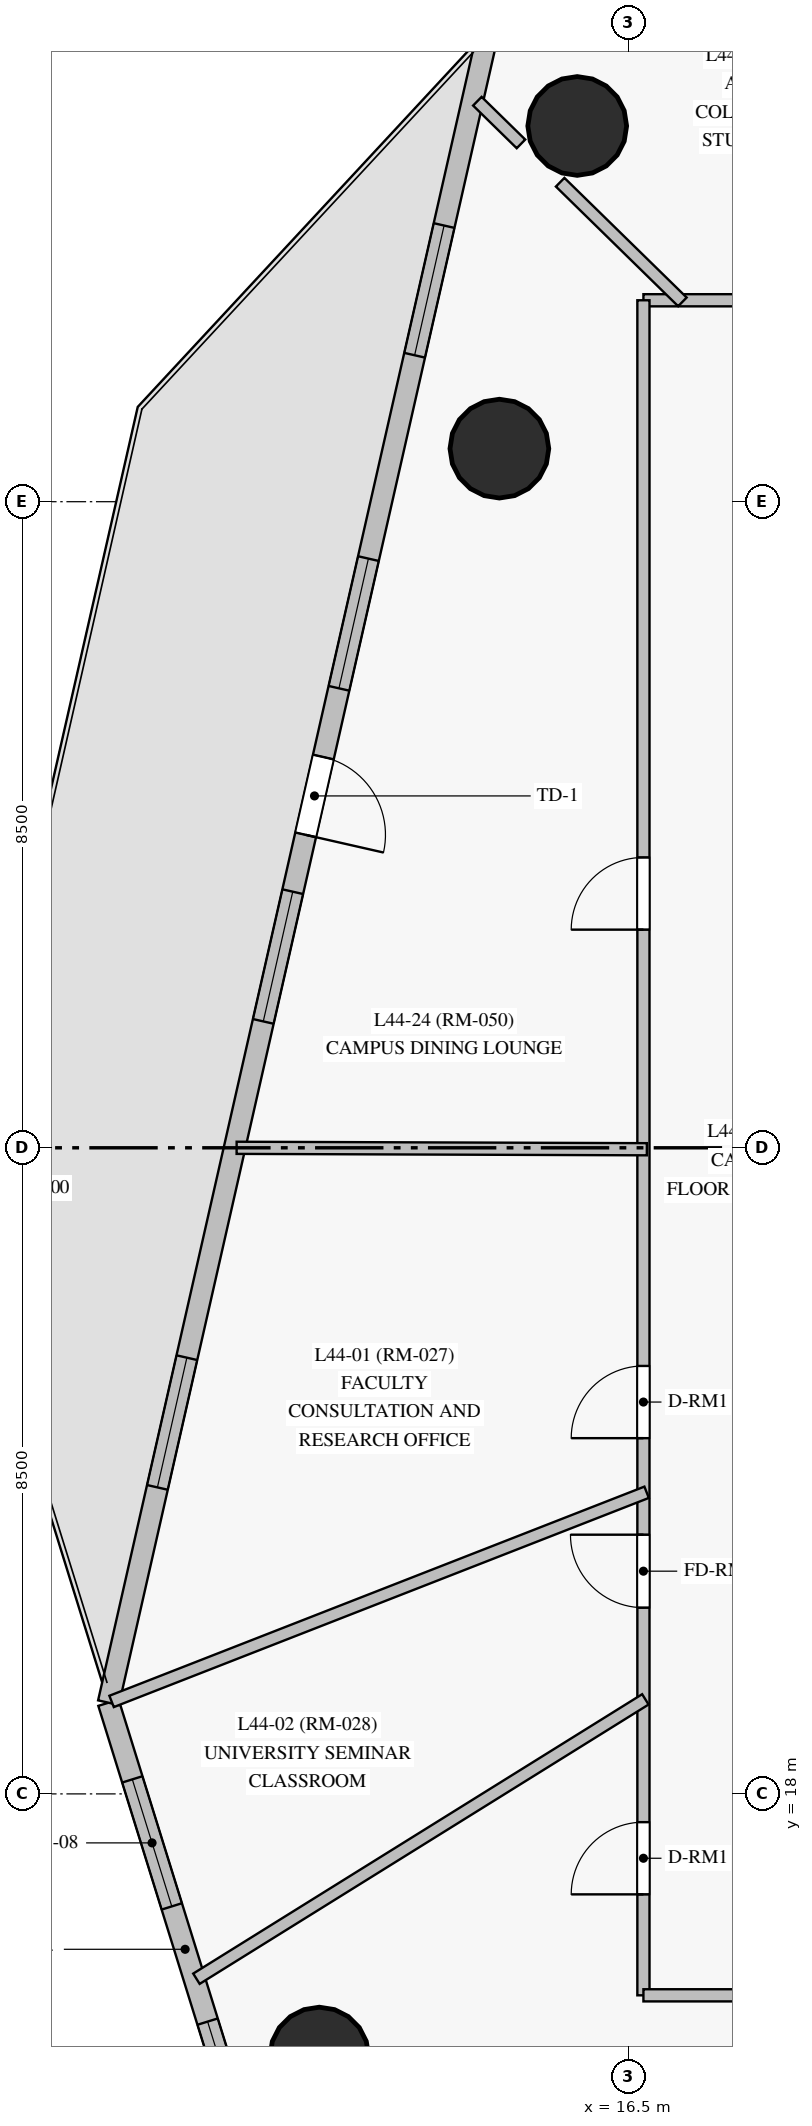
"""IFC4 building model, lengths in metres.
Left out: names, types, materials, properties, quantities, classifications, styles, units other than length and angle.
Written with IfcOpenShell. Run it as: python <this file> out.ifc"""

import sys

from ifc_helpers import new_model, si_unit, direction, frame, frame_2d, origin, origin_with_axes, origin_2d, place, context, subcontext, project, spatial, rectangle, circle, extrude, source, transform, mapped, element, fill, save


model = new_model("IFC4")
c1 = context("Model", 3, precision=1e-05, world=origin(), true_north=direction((0.0, 1.0)))
c2 = subcontext(c1, "Body", "Model", "MODEL_VIEW")
j1 = project(units=[si_unit("LENGTHUNIT", "METRE"), si_unit("PLANEANGLEUNIT", "RADIAN")], contexts=[c1])
p1 = place(None, origin())
s1 = spatial("IfcSite", under=j1, at=p1, CompositionType="ELEMENT")
p2 = place(p1, origin())
s2 = spatial("IfcBuilding", under=s1, at=p2, CompositionType="ELEMENT")
p3 = place(p2, frame((0.0, 0.0, 156.55)))
s3 = spatial("IfcBuildingStorey", under=s2, at=p3, CompositionType="ELEMENT", Elevation=156.55)
m1 = source(origin_with_axes(), c2, "Body", "SweptSolid", [
    extrude(circle(Radius=0.65, at=origin_2d()), origin(), (0.0, 0.0, 1.0), 3.05),
])
for number, where, z_axis, x_axis in (
    (1, (15.829, 39.943, 0.0), (0.0, 0.0, 1.0), (1.0, 0.0, 0.0)),
    (2, (14.805, 35.698, 0.0), (0.0, 0.0, 1.0), (1.0, 0.0, 0.0)),
    (3, (12.436, 14.544, 0.0), (0.0, 0.0, 1.0), (1.0, 0.0, 0.0)),
):
    element("IfcColumn", number, at=place(p3, frame(where, z_axis=z_axis, x_axis=x_axis)), inside=s3, PredefinedType="COLUMN", context=c2, shape_type="MappedRepresentation", body=[
        mapped(m1, transform((0.0, 0.0, 0.0), scale=1.0)),
    ])
p4 = place(p3, frame((9.662, 19.2, 0.0), z_axis=(0.0, 0.0, 1.0), x_axis=(0.2968015378, -0.954939185058, 0.0)))
e4 = element("IfcWall", 4, at=p4, inside=s3, PredefinedType="SOLIDWALL", context=c2, shape_type="SweptSolid", body=[
    extrude(rectangle(XDim=6.794, YDim=0.28, at=frame_2d((3.397, 0.0))), origin(), (0.0, 0.0, 1.0), 2.825),
])
p5 = place(p4, frame((1.056, 0.0, 0.85)))
e5 = element("IfcOpeningElement", 5, at=p5, cuts=e4, PredefinedType="OPENING", context=c2, shape_type="SweptSolid", body=[
    extrude(rectangle(XDim=1.75, YDim=1.65, at=frame_2d((0.875, 0.825))), frame((0.0, 0.15, 0.0), z_axis=(0.0, -1.0, 0.0), x_axis=(1.0, 0.0, 0.0)), (0.0, 0.0, 1.0), 0.3),
])
p6 = place(p4, frame((4.393, 0.0, 0.85)))
e6 = element("IfcOpeningElement", 6, at=p6, cuts=e4, PredefinedType="OPENING", context=c2, shape_type="SweptSolid", body=[
    extrude(rectangle(XDim=1.75, YDim=1.65, at=frame_2d((0.875, 0.825))), frame((0.0, 0.15, 0.0), z_axis=(0.0, -1.0, 0.0), x_axis=(1.0, 0.0, 0.0)), (0.0, 0.0, 1.0), 0.3),
])
p7 = place(p3, frame((14.666, 41.223, 0.0), z_axis=(0.0, 0.0, 1.0), x_axis=(-0.221558962352, -0.975146976718, 0.0)))
e7 = element("IfcWall", 7, at=p7, inside=s3, PredefinedType="SOLIDWALL", context=c2, shape_type="SweptSolid", body=[
    extrude(rectangle(XDim=22.585, YDim=0.28, at=frame_2d((11.292, 0.0))), origin(), (0.0, 0.0, 1.0), 2.825),
])
p8 = place(p7, frame((2.656, 0.0, 0.85)))
e8 = element("IfcOpeningElement", 8, at=p8, cuts=e7, PredefinedType="OPENING", context=c2, shape_type="SweptSolid", body=[
    extrude(rectangle(XDim=1.75, YDim=1.65, at=frame_2d((0.875, 0.825))), frame((0.0, 0.15, 0.0), z_axis=(0.0, -1.0, 0.0), x_axis=(1.0, 0.0, 0.0)), (0.0, 0.0, 1.0), 0.3),
])
p9 = place(p7, frame((7.15, 0.0, 0.85)))
e9 = element("IfcOpeningElement", 9, at=p9, cuts=e7, PredefinedType="OPENING", context=c2, shape_type="SweptSolid", body=[
    extrude(rectangle(XDim=1.75, YDim=1.65, at=frame_2d((0.875, 0.825))), frame((0.0, 0.15, 0.0), z_axis=(0.0, -1.0, 0.0), x_axis=(1.0, 0.0, 0.0)), (0.0, 0.0, 1.0), 0.3),
])
p10 = place(p7, frame((11.643, 0.0, 0.85)))
e10 = element("IfcOpeningElement", 10, at=p10, cuts=e7, PredefinedType="OPENING", context=c2, shape_type="SweptSolid", body=[
    extrude(rectangle(XDim=1.75, YDim=1.65, at=frame_2d((0.875, 0.825))), frame((0.0, 0.15, 0.0), z_axis=(0.0, -1.0, 0.0), x_axis=(1.0, 0.0, 0.0)), (0.0, 0.0, 1.0), 0.3),
])
p11 = place(p7, frame((17.93, 0.0, 0.85)))
e11 = element("IfcOpeningElement", 11, at=p11, cuts=e7, PredefinedType="OPENING", context=c2, shape_type="SweptSolid", body=[
    extrude(rectangle(XDim=1.75, YDim=1.65, at=frame_2d((0.875, 0.825))), frame((0.0, 0.15, 0.0), z_axis=(0.0, -1.0, 0.0), x_axis=(1.0, 0.0, 0.0)), (0.0, 0.0, 1.0), 0.3),
])
p12 = place(p7, frame((9.826, 0.0, 0.0)))
e12 = element("IfcOpeningElement", 12, at=p12, cuts=e7, PredefinedType="OPENING", context=c2, shape_type="SweptSolid", body=[
    extrude(rectangle(XDim=1.05, YDim=2.12, at=frame_2d((0.525, 1.06))), frame((0.0, 0.15, 0.0), z_axis=(0.0, -1.0, 0.0), x_axis=(1.0, 0.0, 0.0)), (0.0, 0.0, 1.0), 0.3),
])
p13 = place(p3, frame((16.7, 37.65, 0.0), z_axis=(0.0, 0.0, 1.0), x_axis=(1.0, 0.0, 0.0)))
e13 = element("IfcWall", 13, at=p13, inside=s3, PredefinedType="PARTITIONING", context=c2, shape_type="SweptSolid", body=[
    extrude(rectangle(XDim=23.5, YDim=0.16, at=frame_2d((11.75, 0.0))), origin(), (0.0, 0.0, 1.0), 2.375),
])
p14 = place(p13, frame((21.26, 0.0, 0.0)))
e14 = element("IfcOpeningElement", 14, at=p14, cuts=e13, PredefinedType="OPENING", context=c2, shape_type="SweptSolid", body=[
    extrude(rectangle(XDim=0.95, YDim=2.15, at=frame_2d((0.475, 1.075))), frame((0.0, 0.09, 0.0), z_axis=(0.0, -1.0, 0.0), x_axis=(1.0, 0.0, 0.0)), (0.0, 0.0, 1.0), 0.18),
])
p15 = place(p13, frame((17.365, 0.0, 0.0)))
e15 = element("IfcOpeningElement", 15, at=p15, cuts=e13, PredefinedType="OPENING", context=c2, shape_type="SweptSolid", body=[
    extrude(rectangle(XDim=0.86, YDim=2.1, at=frame_2d((0.43, 1.05))), frame((0.0, 0.09, 0.0), z_axis=(0.0, -1.0, 0.0), x_axis=(1.0, 0.0, 0.0)), (0.0, 0.0, 1.0), 0.18),
])
p16 = place(p13, frame((15.16, 0.0, 0.0)))
e16 = element("IfcOpeningElement", 16, at=p16, cuts=e13, PredefinedType="OPENING", context=c2, shape_type="SweptSolid", body=[
    extrude(rectangle(XDim=0.95, YDim=2.15, at=frame_2d((0.475, 1.075))), frame((0.0, 0.09, 0.0), z_axis=(0.0, -1.0, 0.0), x_axis=(1.0, 0.0, 0.0)), (0.0, 0.0, 1.0), 0.18),
])
p17 = place(p13, frame((13.06, 0.0, 0.0)))
e17 = element("IfcOpeningElement", 17, at=p17, cuts=e13, PredefinedType="OPENING", context=c2, shape_type="SweptSolid", body=[
    extrude(rectangle(XDim=0.95, YDim=2.15, at=frame_2d((0.475, 1.075))), frame((0.0, 0.09, 0.0), z_axis=(0.0, -1.0, 0.0), x_axis=(1.0, 0.0, 0.0)), (0.0, 0.0, 1.0), 0.18),
])
p18 = place(p13, frame((10.973, 0.0, 0.0)))
e18 = element("IfcOpeningElement", 18, at=p18, cuts=e13, PredefinedType="OPENING", context=c2, shape_type="SweptSolid", body=[
    extrude(rectangle(XDim=0.95, YDim=2.15, at=frame_2d((0.475, 1.075))), frame((0.0, 0.09, 0.0), z_axis=(0.0, -1.0, 0.0), x_axis=(1.0, 0.0, 0.0)), (0.0, 0.0, 1.0), 0.18),
])
p19 = place(p13, frame((8.885, 0.0, 0.0)))
e19 = element("IfcOpeningElement", 19, at=p19, cuts=e13, PredefinedType="OPENING", context=c2, shape_type="SweptSolid", body=[
    extrude(rectangle(XDim=0.95, YDim=2.15, at=frame_2d((0.475, 1.075))), frame((0.0, 0.09, 0.0), z_axis=(0.0, -1.0, 0.0), x_axis=(1.0, 0.0, 0.0)), (0.0, 0.0, 1.0), 0.18),
])
p20 = place(p13, frame((6.51, 0.0, 0.0)))
e20 = element("IfcOpeningElement", 20, at=p20, cuts=e13, PredefinedType="OPENING", context=c2, shape_type="SweptSolid", body=[
    extrude(rectangle(XDim=0.95, YDim=2.15, at=frame_2d((0.475, 1.075))), frame((0.0, 0.09, 0.0), z_axis=(0.0, -1.0, 0.0), x_axis=(1.0, 0.0, 0.0)), (0.0, 0.0, 1.0), 0.18),
])
p21 = place(p13, frame((3.96, 0.0, 0.0)))
e21 = element("IfcOpeningElement", 21, at=p21, cuts=e13, PredefinedType="OPENING", context=c2, shape_type="SweptSolid", body=[
    extrude(rectangle(XDim=0.95, YDim=2.15, at=frame_2d((0.475, 1.075))), frame((0.0, 0.09, 0.0), z_axis=(0.0, -1.0, 0.0), x_axis=(1.0, 0.0, 0.0)), (0.0, 0.0, 1.0), 0.18),
])
p22 = place(p13, frame((2.364, 0.0, 0.0)))
e22 = element("IfcOpeningElement", 22, at=p22, cuts=e13, PredefinedType="OPENING", context=c2, shape_type="SweptSolid", body=[
    extrude(rectangle(XDim=0.95, YDim=2.15, at=frame_2d((0.475, 1.075))), frame((0.0, 0.09, 0.0), z_axis=(0.0, -1.0, 0.0), x_axis=(1.0, 0.0, 0.0)), (0.0, 0.0, 1.0), 0.18),
])
p23 = place(p3, frame((16.7, 15.35, 0.0), z_axis=(0.0, 0.0, 1.0), x_axis=(0.0, 1.0, 0.0)))
e23 = element("IfcWall", 23, at=p23, inside=s3, PredefinedType="PARTITIONING", context=c2, shape_type="SweptSolid", body=[
    extrude(rectangle(XDim=22.3, YDim=0.16, at=frame_2d((11.15, 0.0))), origin(), (0.0, 0.0, 1.0), 2.275),
])
p24 = place(p23, frame((7.33, 0.0, 0.0)))
e24 = element("IfcOpeningElement", 24, at=p24, cuts=e23, PredefinedType="OPENING", context=c2, shape_type="SweptSolid", body=[
    extrude(rectangle(XDim=0.95, YDim=2.15, at=frame_2d((0.475, 1.075))), frame((0.0, 0.09, 0.0), z_axis=(0.0, -1.0, 0.0), x_axis=(1.0, 0.0, 0.0)), (0.0, 0.0, 1.0), 0.18),
])
p25 = place(p23, frame((5.1, 0.0, 0.0)))
e25 = element("IfcOpeningElement", 25, at=p25, cuts=e23, PredefinedType="OPENING", context=c2, shape_type="SweptSolid", body=[
    extrude(rectangle(XDim=0.96, YDim=2.15, at=frame_2d((0.48, 1.075))), frame((0.0, 0.09, 0.0), z_axis=(0.0, -1.0, 0.0), x_axis=(1.0, 0.0, 0.0)), (0.0, 0.0, 1.0), 0.18),
])
p26 = place(p23, frame((1.328, 0.0, 0.0)))
e26 = element("IfcOpeningElement", 26, at=p26, cuts=e23, PredefinedType="OPENING", context=c2, shape_type="SweptSolid", body=[
    extrude(rectangle(XDim=0.95, YDim=2.15, at=frame_2d((0.475, 1.075))), frame((0.0, 0.09, 0.0), z_axis=(0.0, -1.0, 0.0), x_axis=(1.0, 0.0, 0.0)), (0.0, 0.0, 1.0), 0.18),
])
p27 = place(p23, frame((14.02, 0.0, 0.0)))
e27 = element("IfcOpeningElement", 27, at=p27, cuts=e23, PredefinedType="OPENING", context=c2, shape_type="SweptSolid", body=[
    extrude(rectangle(XDim=0.95, YDim=2.15, at=frame_2d((0.475, 1.075))), frame((0.0, 0.09, 0.0), z_axis=(0.0, -1.0, 0.0), x_axis=(1.0, 0.0, 0.0)), (0.0, 0.0, 1.0), 0.18),
])
p28 = place(p3, frame((27.55, 15.35, 0.0), z_axis=(0.0, 0.0, 1.0), x_axis=(-1.0, 0.0, 0.0)))
e28 = element("IfcWall", 28, at=p28, inside=s3, PredefinedType="PARTITIONING", context=c2, shape_type="SweptSolid", body=[
    extrude(rectangle(XDim=10.85, YDim=0.16, at=frame_2d((5.425, 0.0))), origin(), (0.0, 0.0, 1.0), 2.375),
])
p29 = place(p28, frame((5.24, 0.0, 0.0)))
e29 = element("IfcOpeningElement", 29, at=p29, cuts=e28, PredefinedType="OPENING", context=c2, shape_type="SweptSolid", body=[
    extrude(rectangle(XDim=0.95, YDim=2.15, at=frame_2d((0.475, 1.075))), frame((0.0, 0.09, 0.0), z_axis=(0.0, -1.0, 0.0), x_axis=(1.0, 0.0, 0.0)), (0.0, 0.0, 1.0), 0.18),
])
p30 = place(p28, frame((3.323, 0.0, 0.0)))
e30 = element("IfcOpeningElement", 30, at=p30, cuts=e28, PredefinedType="OPENING", context=c2, shape_type="SweptSolid", body=[
    extrude(rectangle(XDim=0.95, YDim=2.15, at=frame_2d((0.475, 1.075))), frame((0.0, 0.09, 0.0), z_axis=(0.0, -1.0, 0.0), x_axis=(1.0, 0.0, 0.0)), (0.0, 0.0, 1.0), 0.18),
])
p31 = place(p3, frame((22.782, 15.39, 0.0), z_axis=(0.0, 0.0, 1.0), x_axis=(-0.453312470981, -0.891351672267, 0.0)))
e31 = element("IfcWall", 31, at=p31, inside=s3, PredefinedType="PARTITIONING", context=c2, shape_type="SweptSolid", body=[
    extrude(rectangle(XDim=10.694, YDim=0.16, at=frame_2d((5.347, 0.0))), origin(), (0.0, 0.0, 1.0), 2.825),
])
p32 = place(p3, frame((16.742, 21.968, 0.0), z_axis=(0.0, 0.0, 1.0), x_axis=(-0.931359979556, -0.364099695799, 0.0)))
e32 = element("IfcWall", 32, at=p32, inside=s3, PredefinedType="PARTITIONING", context=c2, shape_type="SweptSolid", body=[
    extrude(rectangle(XDim=7.558, YDim=0.16, at=frame_2d((3.779, 0.0))), origin(), (0.0, 0.0, 1.0), 2.825),
])
p33 = place(p3, frame((19.094, 15.385, 0.0), z_axis=(0.0, 0.0, 1.0), x_axis=(-0.642788201526, -0.766043946506, 0.0)))
e33 = element("IfcWall", 33, at=p33, inside=s3, PredefinedType="PARTITIONING", context=c2, shape_type="SweptSolid", body=[
    extrude(rectangle(XDim=7.331, YDim=0.16, at=frame_2d((3.666, 0.0))), origin(), (0.0, 0.0, 1.0), 2.275),
])
p34 = place(p3, frame((16.726, 19.243, 0.0), z_axis=(0.0, 0.0, 1.0), x_axis=(-0.849037712217, -0.528332247012, 0.0)))
e34 = element("IfcWall", 34, at=p34, inside=s3, PredefinedType="PARTITIONING", context=c2, shape_type="SweptSolid", body=[
    extrude(rectangle(XDim=6.956, YDim=0.16, at=frame_2d((3.478, 0.0))), origin(), (0.0, 0.0, 1.0), 2.825),
])
p35 = place(p3, frame((11.348, 26.5, 0.0), z_axis=(0.0, 0.0, 1.0), x_axis=(0.999993933654, -0.003483196096, 0.0)))
e35 = element("IfcWall", 35, at=p35, inside=s3, PredefinedType="PARTITIONING", context=c2, shape_type="SweptSolid", body=[
    extrude(rectangle(XDim=5.397, YDim=0.16, at=frame_2d((2.698, 0.0))), origin(), (0.0, 0.0, 1.0), 2.825),
])
p36 = place(p3, frame((17.213, 37.629, 0.0), z_axis=(0.0, 0.0, 1.0), x_axis=(-0.71471376476, 0.699417067609, 0.0)))
e36 = element("IfcWall", 36, at=p36, inside=s3, PredefinedType="PARTITIONING", context=c2, shape_type="SweptSolid", body=[
    extrude(rectangle(XDim=2.25, YDim=0.16, at=frame_2d((1.125, 0.0))), origin(), (0.0, 0.0, 1.0), 2.275),
])
p37 = place(p3, frame((15.089, 39.707, 0.0), z_axis=(0.0, 0.0, 1.0), x_axis=(-0.714817505013, 0.699311042761, 0.0)))
e37 = element("IfcWall", 37, at=p37, inside=s3, PredefinedType="PARTITIONING", context=c2, shape_type="SweptSolid", body=[
    extrude(rectangle(XDim=0.803, YDim=0.16, at=frame_2d((0.401, 0.0))), origin(), (0.0, 0.0, 1.0), 2.825),
])
m2 = source(origin_with_axes(), c2, "Body", "SweptSolid", [
    extrude(rectangle(XDim=1.75, YDim=1.65, at=frame_2d((0.875, 0.825))), frame((0.0, 0.03, 0.0), z_axis=(0.0, -1.0, 0.0), x_axis=(1.0, 0.0, 0.0)), (0.0, 0.0, 1.0), 0.06),
])
p38 = place(p5, origin())
e38 = element("IfcWindow", 38, at=p38, inside=s3, PartitioningType="SINGLE_PANEL", PredefinedType="WINDOW", context=c2, shape_type="MappedRepresentation", body=[
    mapped(m2, transform((0.0, 0.0, 0.0), scale=1.0)),
])
fill(e5, e38)
p39 = place(p6, origin())
e39 = element("IfcWindow", 39, at=p39, inside=s3, PartitioningType="SINGLE_PANEL", PredefinedType="WINDOW", context=c2, shape_type="MappedRepresentation", body=[
    mapped(m2, transform((0.0, 0.0, 0.0), scale=1.0)),
])
fill(e6, e39)
p40 = place(p8, origin())
e40 = element("IfcWindow", 40, at=p40, inside=s3, PartitioningType="SINGLE_PANEL", PredefinedType="WINDOW", context=c2, shape_type="MappedRepresentation", body=[
    mapped(m2, transform((0.0, 0.0, 0.0), scale=1.0)),
])
fill(e8, e40)
p41 = place(p9, origin())
e41 = element("IfcWindow", 41, at=p41, inside=s3, PartitioningType="SINGLE_PANEL", PredefinedType="WINDOW", context=c2, shape_type="MappedRepresentation", body=[
    mapped(m2, transform((0.0, 0.0, 0.0), scale=1.0)),
])
fill(e9, e41)
p42 = place(p10, origin())
e42 = element("IfcWindow", 42, at=p42, inside=s3, PartitioningType="SINGLE_PANEL", PredefinedType="WINDOW", context=c2, shape_type="MappedRepresentation", body=[
    mapped(m2, transform((0.0, 0.0, 0.0), scale=1.0)),
])
fill(e10, e42)
p43 = place(p11, origin())
e43 = element("IfcWindow", 43, at=p43, inside=s3, PartitioningType="SINGLE_PANEL", PredefinedType="WINDOW", context=c2, shape_type="MappedRepresentation", body=[
    mapped(m2, transform((0.0, 0.0, 0.0), scale=1.0)),
])
fill(e11, e43)
m3 = source(origin_with_axes(), c2, "Body", "SweptSolid", [
    extrude(rectangle(XDim=1.05, YDim=2.12, at=frame_2d((0.525, 1.06))), frame((0.0, 0.025, 0.0), z_axis=(0.0, -1.0, 0.0), x_axis=(1.0, 0.0, 0.0)), (0.0, 0.0, 1.0), 0.05),
])
p44 = place(p12, origin())
e44 = element("IfcDoor", 44, at=p44, inside=s3, OperationType="SINGLE_SWING_RIGHT", PredefinedType="DOOR", context=c2, shape_type="MappedRepresentation", body=[
    mapped(m3, transform((0.0, 0.0, 0.0), scale=1.0)),
])
fill(e12, e44)
m4 = source(origin_with_axes(), c2, "Body", "SweptSolid", [
    extrude(rectangle(XDim=0.95, YDim=2.15, at=frame_2d((0.475, 1.075))), frame((0.0, 0.025, 0.0), z_axis=(0.0, -1.0, 0.0), x_axis=(1.0, 0.0, 0.0)), (0.0, 0.0, 1.0), 0.05),
])
p45 = place(p24, origin())
e45 = element("IfcDoor", 45, at=p45, inside=s3, OperationType="SINGLE_SWING_LEFT", PredefinedType="DOOR", context=c2, shape_type="MappedRepresentation", body=[
    mapped(m4, transform((0.0, 0.0, 0.0), scale=1.0)),
])
fill(e24, e45)
m5 = source(origin_with_axes(), c2, "Body", "SweptSolid", [
    extrude(rectangle(XDim=0.96, YDim=2.15, at=frame_2d((0.48, 1.075))), frame((0.0, 0.025, 0.0), z_axis=(0.0, -1.0, 0.0), x_axis=(1.0, 0.0, 0.0)), (0.0, 0.0, 1.0), 0.05),
])
p46 = place(p25, origin())
e46 = element("IfcDoor", 46, at=p46, inside=s3, OperationType="SINGLE_SWING_RIGHT", PredefinedType="DOOR", context=c2, shape_type="MappedRepresentation", body=[
    mapped(m5, transform((0.0, 0.0, 0.0), scale=1.0)),
])
fill(e25, e46)
p47 = place(p26, origin())
e47 = element("IfcDoor", 47, at=p47, inside=s3, OperationType="SINGLE_SWING_LEFT", PredefinedType="DOOR", context=c2, shape_type="MappedRepresentation", body=[
    mapped(m4, transform((0.0, 0.0, 0.0), scale=1.0)),
])
fill(e26, e47)
p48 = place(p27, origin())
e48 = element("IfcDoor", 48, at=p48, inside=s3, OperationType="SINGLE_SWING_LEFT", PredefinedType="DOOR", context=c2, shape_type="MappedRepresentation", body=[
    mapped(m4, transform((0.0, 0.0, 0.0), scale=1.0)),
])
fill(e27, e48)
save(model, sys.argv[1])
